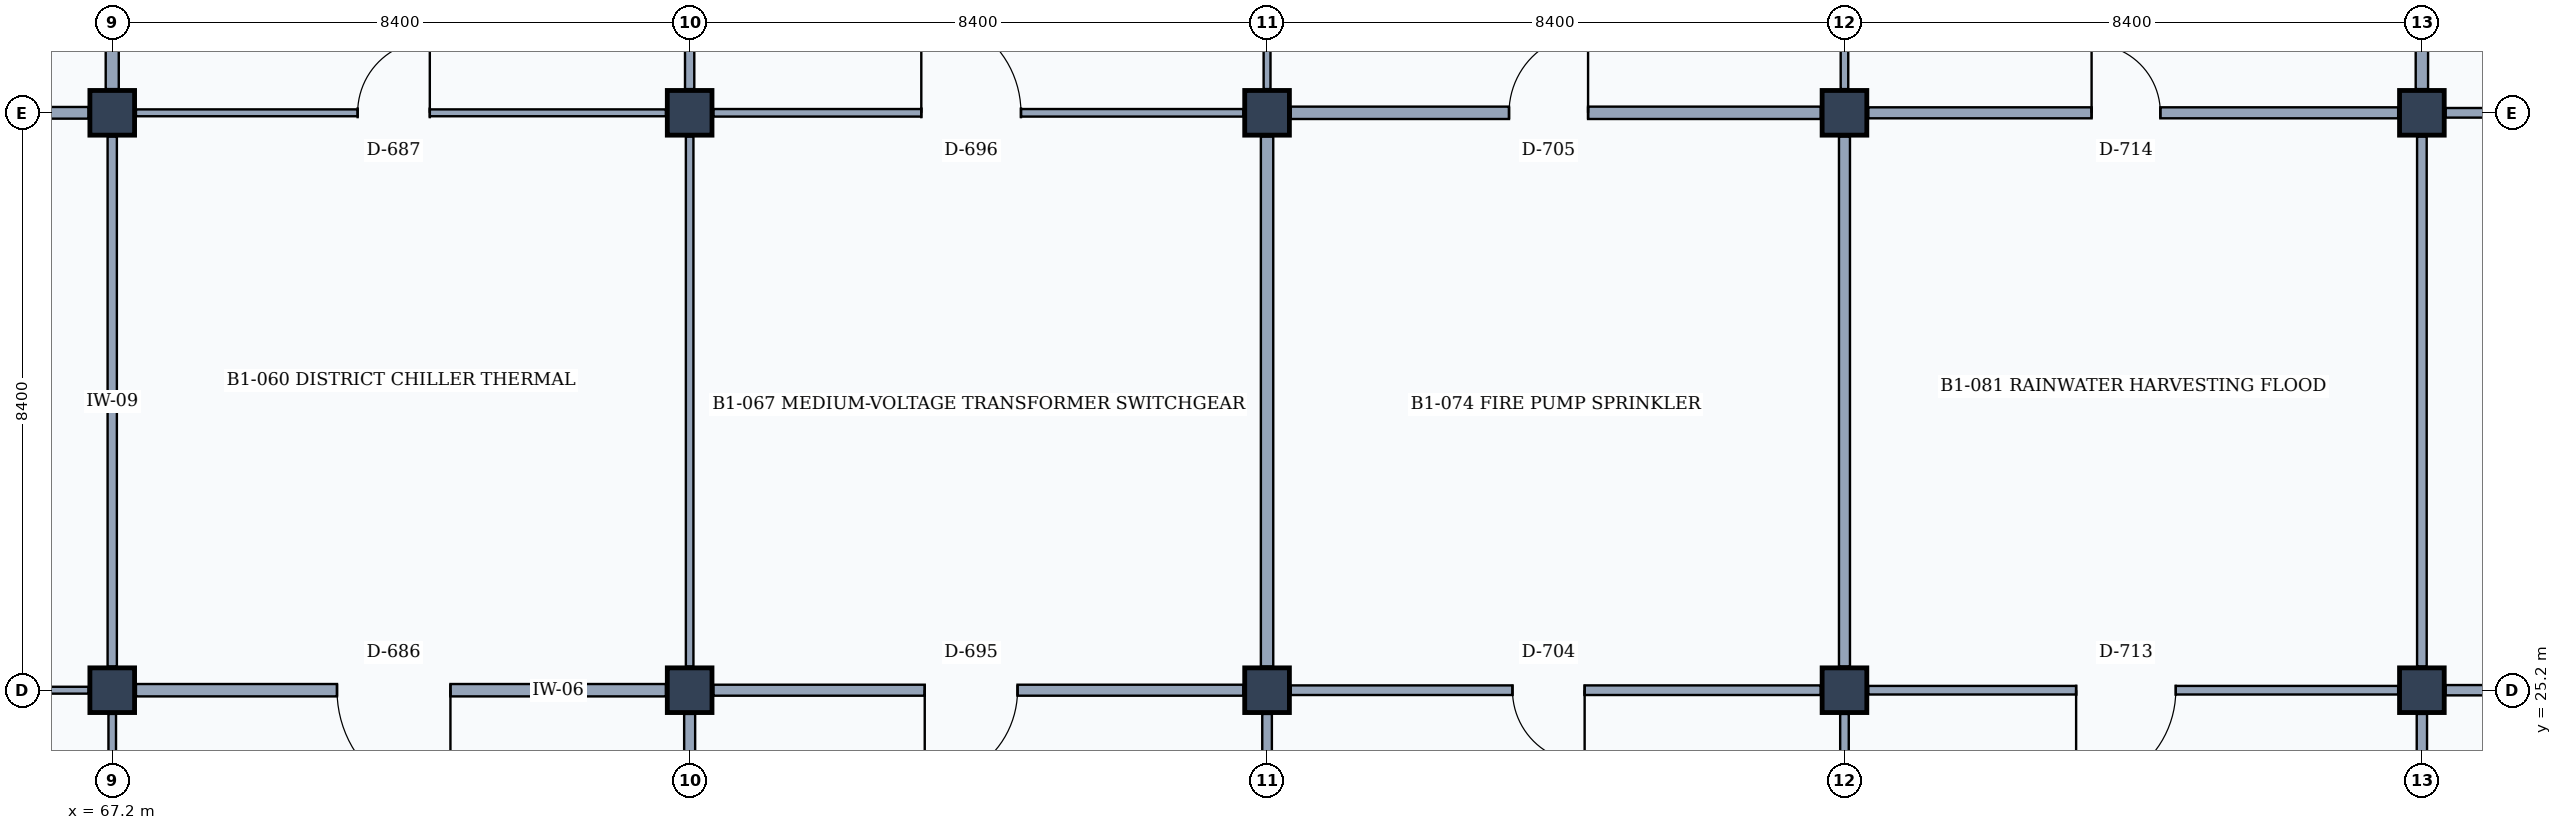
"""IFC4 building model, lengths in metres.
Left out: names, types, materials, properties, quantities, classifications, styles, units other than length and angle.
Written with IfcOpenShell. Run it as: python <this file> out.ifc"""

import sys

from ifc_helpers import new_model, si_unit, direction, frame, frame_2d, origin, origin_2d, place, context, subcontext, project, spatial, rectangle, extrude, element, fill, save


model = new_model("IFC4")
c1 = context("Model", 3, precision=1e-05, world=origin(), true_north=direction((0.0, 1.0)))
c2 = subcontext(c1, "Body", "Model", "MODEL_VIEW")
j1 = project(units=[si_unit("LENGTHUNIT", "METRE"), si_unit("PLANEANGLEUNIT", "RADIAN")], contexts=[c1])
p1 = place(None, origin())
s1 = spatial("IfcSite", under=j1, at=p1, CompositionType="ELEMENT")
p2 = place(p1, origin())
s2 = spatial("IfcBuilding", under=s1, at=p2, CompositionType="ELEMENT")
p3 = place(p2, frame((0.0, 0.0, -4.2)))
s3 = spatial("IfcBuildingStorey", under=s2, at=p3, CompositionType="ELEMENT", Elevation=-4.2)
for number, where, z_axis, x_axis in (
    (1, (67.2, 25.2, 0.0), (0.0, 0.0, 1.0), (1.0, 0.0, 0.0)),
    (2, (67.2, 33.6, 0.0), (0.0, 0.0, 1.0), (1.0, 0.0, 0.0)),
    (3, (75.6, 25.2, 0.0), (0.0, 0.0, 1.0), (1.0, 0.0, 0.0)),
    (4, (75.6, 33.6, 0.0), (0.0, 0.0, 1.0), (1.0, 0.0, 0.0)),
    (5, (84.0, 25.2, 0.0), (0.0, 0.0, 1.0), (1.0, 0.0, 0.0)),
    (6, (84.0, 33.6, 0.0), (0.0, 0.0, 1.0), (1.0, 0.0, 0.0)),
    (7, (92.4, 25.2, 0.0), (0.0, 0.0, 1.0), (1.0, 0.0, 0.0)),
    (8, (92.4, 33.6, 0.0), (0.0, 0.0, 1.0), (1.0, 0.0, 0.0)),
    (9, (100.8, 25.2, 0.0), (0.0, 0.0, 1.0), (1.0, 0.0, 0.0)),
    (10, (100.8, 33.6, 0.0), (0.0, 0.0, 1.0), (1.0, 0.0, 0.0)),
):
    element("IfcColumn", number, at=place(p3, frame(where, z_axis=z_axis, x_axis=x_axis)), inside=s3, PredefinedType="COLUMN", context=c2, shape_type="SweptSolid", body=[
        extrude(rectangle(XDim=0.65, YDim=0.65, at=origin_2d()), origin(), (0.0, 0.0, 1.0), 4.2),
    ])
p4 = place(p3, frame((67.2, 17.095, 0.0), z_axis=(0.0, 0.0, 1.0), x_axis=(0.0, 1.0, 0.0)))
e11 = element("IfcWall", 11, at=p4, inside=s3, PredefinedType="PARTITIONING", context=c2, shape_type="SweptSolid", body=[
    extrude(rectangle(XDim=7.76, YDim=0.11, at=frame_2d((3.88, 0.0))), origin(), (0.0, 0.0, 1.0), 3.25),
])
p5 = place(p3, frame((59.145, 25.2, 0.0), z_axis=(0.0, 0.0, 1.0), x_axis=(1.0, 0.0, 0.0)))
e12 = element("IfcWall", 12, at=p5, inside=s3, PredefinedType="MOVABLE", context=c2, shape_type="SweptSolid", body=[
    extrude(rectangle(XDim=7.71, YDim=0.1, at=frame_2d((3.855, 0.0))), origin(), (0.0, 0.0, 1.0), 2.95),
])
p6 = place(p5, frame((3.125, 0.0, 0.0)))
e13 = element("IfcOpeningElement", 13, at=p6, cuts=e12, PredefinedType="OPENING", context=c2, shape_type="SweptSolid", body=[
    extrude(rectangle(XDim=1.25, YDim=2.3, at=frame_2d((0.625, 1.15))), frame((0.0, 0.06, 0.0), z_axis=(0.0, -1.0, 0.0), x_axis=(1.0, 0.0, 0.0)), (0.0, 0.0, 1.0), 0.12),
])
p7 = place(p3, frame((67.2, 25.545, 0.0), z_axis=(0.0, 0.0, 1.0), x_axis=(0.0, 1.0, 0.0)))
e14 = element("IfcWall", 14, at=p7, inside=s3, PredefinedType="PARTITIONING", context=c2, shape_type="SweptSolid", body=[
    extrude(rectangle(XDim=7.71, YDim=0.135, at=frame_2d((3.855, 0.0))), origin(), (0.0, 0.0, 1.0), 3.25),
])
p8 = place(p3, frame((59.145, 33.6, 0.0), z_axis=(0.0, 0.0, 1.0), x_axis=(1.0, 0.0, 0.0)))
e15 = element("IfcWall", 15, at=p8, inside=s3, PredefinedType="PARTITIONING", context=c2, shape_type="SweptSolid", body=[
    extrude(rectangle(XDim=7.71, YDim=0.17, at=frame_2d((3.855, 0.0))), origin(), (0.0, 0.0, 1.0), 2.95),
])
p9 = place(p8, frame((3.075, 0.0, 0.0)))
e16 = element("IfcOpeningElement", 16, at=p9, cuts=e15, PredefinedType="OPENING", context=c2, shape_type="SweptSolid", body=[
    extrude(rectangle(XDim=1.35, YDim=2.25, at=frame_2d((0.675, 1.125))), frame((0.0, 0.095, 0.0), z_axis=(0.0, -1.0, 0.0), x_axis=(1.0, 0.0, 0.0)), (0.0, 0.0, 1.0), 0.19),
])
p10 = place(p3, frame((67.2, 33.945, 0.0), z_axis=(0.0, 0.0, 1.0), x_axis=(0.0, 1.0, 0.0)))
e17 = element("IfcWall", 17, at=p10, inside=s3, PredefinedType="PARTITIONING", context=c2, shape_type="SweptSolid", body=[
    extrude(rectangle(XDim=7.71, YDim=0.19, at=frame_2d((3.855, 0.0))), origin(), (0.0, 0.0, 1.0), 3.25),
])
p11 = place(p3, frame((75.6, 17.095, 0.0), z_axis=(0.0, 0.0, 1.0), x_axis=(0.0, 1.0, 0.0)))
e18 = element("IfcWall", 18, at=p11, inside=s3, PredefinedType="PARTITIONING", context=c2, shape_type="SweptSolid", body=[
    extrude(rectangle(XDim=7.76, YDim=0.16, at=frame_2d((3.88, 0.0))), origin(), (0.0, 0.0, 1.0), 3.25),
])
p12 = place(p3, frame((67.545, 25.2, 0.0), z_axis=(0.0, 0.0, 1.0), x_axis=(1.0, 0.0, 0.0)))
e19 = element("IfcWall", 19, at=p12, inside=s3, PredefinedType="PARTITIONING", context=c2, shape_type="SweptSolid", body=[
    extrude(rectangle(XDim=7.71, YDim=0.18, at=frame_2d((3.855, 0.0))), origin(), (0.0, 0.0, 1.0), 2.95),
])
p13 = place(p12, frame((2.925, 0.0, 0.0)))
e20 = element("IfcOpeningElement", 20, at=p13, cuts=e19, PredefinedType="OPENING", context=c2, shape_type="SweptSolid", body=[
    extrude(rectangle(XDim=1.65, YDim=2.25, at=frame_2d((0.825, 1.125))), frame((0.0, 0.1, 0.0), z_axis=(0.0, -1.0, 0.0), x_axis=(1.0, 0.0, 0.0)), (0.0, 0.0, 1.0), 0.2),
])
p14 = place(p3, frame((75.6, 25.545, 0.0), z_axis=(0.0, 0.0, 1.0), x_axis=(0.0, 1.0, 0.0)))
e21 = element("IfcWall", 21, at=p14, inside=s3, PredefinedType="PARTITIONING", context=c2, shape_type="SweptSolid", body=[
    extrude(rectangle(XDim=7.71, YDim=0.11, at=frame_2d((3.855, 0.0))), origin(), (0.0, 0.0, 1.0), 3.25),
])
p15 = place(p3, frame((67.545, 33.6, 0.0), z_axis=(0.0, 0.0, 1.0), x_axis=(1.0, 0.0, 0.0)))
e22 = element("IfcWall", 22, at=p15, inside=s3, PredefinedType="MOVABLE", context=c2, shape_type="SweptSolid", body=[
    extrude(rectangle(XDim=7.71, YDim=0.1, at=frame_2d((3.855, 0.0))), origin(), (0.0, 0.0, 1.0), 2.95),
])
p16 = place(p15, frame((3.225, 0.0, 0.0)))
e23 = element("IfcOpeningElement", 23, at=p16, cuts=e22, PredefinedType="OPENING", context=c2, shape_type="SweptSolid", body=[
    extrude(rectangle(XDim=1.05, YDim=2.2, at=frame_2d((0.525, 1.1))), frame((0.0, 0.06, 0.0), z_axis=(0.0, -1.0, 0.0), x_axis=(1.0, 0.0, 0.0)), (0.0, 0.0, 1.0), 0.12),
])
p17 = place(p3, frame((75.6, 33.945, 0.0), z_axis=(0.0, 0.0, 1.0), x_axis=(0.0, 1.0, 0.0)))
e24 = element("IfcWall", 24, at=p17, inside=s3, PredefinedType="PARTITIONING", context=c2, shape_type="SweptSolid", body=[
    extrude(rectangle(XDim=7.71, YDim=0.135, at=frame_2d((3.855, 0.0))), origin(), (0.0, 0.0, 1.0), 3.25),
])
p18 = place(p3, frame((84.0, 17.095, 0.0), z_axis=(0.0, 0.0, 1.0), x_axis=(0.0, 1.0, 0.0)))
e25 = element("IfcWall", 25, at=p18, inside=s3, PredefinedType="PARTITIONING", context=c2, shape_type="SweptSolid", body=[
    extrude(rectangle(XDim=7.76, YDim=0.14, at=frame_2d((3.88, 0.0))), origin(), (0.0, 0.0, 1.0), 3.25),
])
p19 = place(p3, frame((75.945, 25.2, 0.0), z_axis=(0.0, 0.0, 1.0), x_axis=(1.0, 0.0, 0.0)))
e26 = element("IfcWall", 26, at=p19, inside=s3, PredefinedType="PARTITIONING", context=c2, shape_type="SweptSolid", body=[
    extrude(rectangle(XDim=7.71, YDim=0.16, at=frame_2d((3.855, 0.0))), origin(), (0.0, 0.0, 1.0), 2.95),
])
p20 = place(p19, frame((3.075, 0.0, 0.0)))
e27 = element("IfcOpeningElement", 27, at=p20, cuts=e26, PredefinedType="OPENING", context=c2, shape_type="SweptSolid", body=[
    extrude(rectangle(XDim=1.35, YDim=2.25, at=frame_2d((0.675, 1.125))), frame((0.0, 0.09, 0.0), z_axis=(0.0, -1.0, 0.0), x_axis=(1.0, 0.0, 0.0)), (0.0, 0.0, 1.0), 0.18),
])
p21 = place(p3, frame((84.0, 25.545, 0.0), z_axis=(0.0, 0.0, 1.0), x_axis=(0.0, 1.0, 0.0)))
e28 = element("IfcWall", 28, at=p21, inside=s3, PredefinedType="PARTITIONING", context=c2, shape_type="SweptSolid", body=[
    extrude(rectangle(XDim=7.71, YDim=0.18, at=frame_2d((3.855, 0.0))), origin(), (0.0, 0.0, 1.0), 3.25),
])
p22 = place(p3, frame((75.945, 33.6, 0.0), z_axis=(0.0, 0.0, 1.0), x_axis=(1.0, 0.0, 0.0)))
e29 = element("IfcWall", 29, at=p22, inside=s3, PredefinedType="PARTITIONING", context=c2, shape_type="SweptSolid", body=[
    extrude(rectangle(XDim=7.71, YDim=0.11, at=frame_2d((3.855, 0.0))), origin(), (0.0, 0.0, 1.0), 2.95),
])
p23 = place(p22, frame((3.025, 0.0, 0.0)))
e30 = element("IfcOpeningElement", 30, at=p23, cuts=e29, PredefinedType="OPENING", context=c2, shape_type="SweptSolid", body=[
    extrude(rectangle(XDim=1.45, YDim=2.35, at=frame_2d((0.725, 1.175))), frame((0.0, 0.065, 0.0), z_axis=(0.0, -1.0, 0.0), x_axis=(1.0, 0.0, 0.0)), (0.0, 0.0, 1.0), 0.13),
])
p24 = place(p3, frame((84.0, 33.945, 0.0), z_axis=(0.0, 0.0, 1.0), x_axis=(0.0, 1.0, 0.0)))
e31 = element("IfcWall", 31, at=p24, inside=s3, PredefinedType="MOVABLE", context=c2, shape_type="SweptSolid", body=[
    extrude(rectangle(XDim=7.71, YDim=0.1, at=frame_2d((3.855, 0.0))), origin(), (0.0, 0.0, 1.0), 3.25),
])
p25 = place(p3, frame((92.4, 17.095, 0.0), z_axis=(0.0, 0.0, 1.0), x_axis=(0.0, 1.0, 0.0)))
e32 = element("IfcWall", 32, at=p25, inside=s3, PredefinedType="PARTITIONING", context=c2, shape_type="SweptSolid", body=[
    extrude(rectangle(XDim=7.76, YDim=0.125, at=frame_2d((3.88, 0.0))), origin(), (0.0, 0.0, 1.0), 3.25),
])
p26 = place(p3, frame((84.345, 25.2, 0.0), z_axis=(0.0, 0.0, 1.0), x_axis=(1.0, 0.0, 0.0)))
e33 = element("IfcWall", 33, at=p26, inside=s3, PredefinedType="PARTITIONING", context=c2, shape_type="SweptSolid", body=[
    extrude(rectangle(XDim=7.71, YDim=0.14, at=frame_2d((3.855, 0.0))), origin(), (0.0, 0.0, 1.0), 2.95),
])
p27 = place(p26, frame((3.225, 0.0, 0.0)))
e34 = element("IfcOpeningElement", 34, at=p27, cuts=e33, PredefinedType="OPENING", context=c2, shape_type="SweptSolid", body=[
    extrude(rectangle(XDim=1.05, YDim=2.2, at=frame_2d((0.525, 1.1))), frame((0.0, 0.08, 0.0), z_axis=(0.0, -1.0, 0.0), x_axis=(1.0, 0.0, 0.0)), (0.0, 0.0, 1.0), 0.16),
])
p28 = place(p3, frame((92.4, 25.545, 0.0), z_axis=(0.0, 0.0, 1.0), x_axis=(0.0, 1.0, 0.0)))
e35 = element("IfcWall", 35, at=p28, inside=s3, PredefinedType="PARTITIONING", context=c2, shape_type="SweptSolid", body=[
    extrude(rectangle(XDim=7.71, YDim=0.16, at=frame_2d((3.855, 0.0))), origin(), (0.0, 0.0, 1.0), 3.25),
])
p29 = place(p3, frame((84.345, 33.6, 0.0), z_axis=(0.0, 0.0, 1.0), x_axis=(1.0, 0.0, 0.0)))
e36 = element("IfcWall", 36, at=p29, inside=s3, PredefinedType="PARTITIONING", context=c2, shape_type="SweptSolid", body=[
    extrude(rectangle(XDim=7.71, YDim=0.18, at=frame_2d((3.855, 0.0))), origin(), (0.0, 0.0, 1.0), 2.95),
])
p30 = place(p29, frame((3.175, 0.0, 0.0)))
e37 = element("IfcOpeningElement", 37, at=p30, cuts=e36, PredefinedType="OPENING", context=c2, shape_type="SweptSolid", body=[
    extrude(rectangle(XDim=1.15, YDim=2.25, at=frame_2d((0.575, 1.125))), frame((0.0, 0.1, 0.0), z_axis=(0.0, -1.0, 0.0), x_axis=(1.0, 0.0, 0.0)), (0.0, 0.0, 1.0), 0.2),
])
p31 = place(p3, frame((92.4, 33.945, 0.0), z_axis=(0.0, 0.0, 1.0), x_axis=(0.0, 1.0, 0.0)))
e38 = element("IfcWall", 38, at=p31, inside=s3, PredefinedType="PARTITIONING", context=c2, shape_type="SweptSolid", body=[
    extrude(rectangle(XDim=7.71, YDim=0.11, at=frame_2d((3.855, 0.0))), origin(), (0.0, 0.0, 1.0), 3.25),
])
p32 = place(p3, frame((100.8, 17.095, 0.0), z_axis=(0.0, 0.0, 1.0), x_axis=(0.0, 1.0, 0.0)))
e39 = element("IfcWall", 39, at=p32, inside=s3, PredefinedType="PARTITIONING", context=c2, shape_type="SweptSolid", body=[
    extrude(rectangle(XDim=7.76, YDim=0.15, at=frame_2d((3.88, 0.0))), origin(), (0.0, 0.0, 1.0), 3.25),
])
p33 = place(p3, frame((92.745, 25.2, 0.0), z_axis=(0.0, 0.0, 1.0), x_axis=(1.0, 0.0, 0.0)))
e40 = element("IfcWall", 40, at=p33, inside=s3, PredefinedType="PARTITIONING", context=c2, shape_type="SweptSolid", body=[
    extrude(rectangle(XDim=7.71, YDim=0.125, at=frame_2d((3.855, 0.0))), origin(), (0.0, 0.0, 1.0), 2.95),
])
p34 = place(p33, frame((3.025, 0.0, 0.0)))
e41 = element("IfcOpeningElement", 41, at=p34, cuts=e40, PredefinedType="OPENING", context=c2, shape_type="SweptSolid", body=[
    extrude(rectangle(XDim=1.45, YDim=2.35, at=frame_2d((0.725, 1.175))), frame((0.0, 0.073, 0.0), z_axis=(0.0, -1.0, 0.0), x_axis=(1.0, 0.0, 0.0)), (0.0, 0.0, 1.0), 0.145),
])
p35 = place(p3, frame((100.8, 25.545, 0.0), z_axis=(0.0, 0.0, 1.0), x_axis=(0.0, 1.0, 0.0)))
e42 = element("IfcWall", 42, at=p35, inside=s3, PredefinedType="PARTITIONING", context=c2, shape_type="SweptSolid", body=[
    extrude(rectangle(XDim=7.71, YDim=0.14, at=frame_2d((3.855, 0.0))), origin(), (0.0, 0.0, 1.0), 3.25),
])
p36 = place(p3, frame((92.745, 33.6, 0.0), z_axis=(0.0, 0.0, 1.0), x_axis=(1.0, 0.0, 0.0)))
e43 = element("IfcWall", 43, at=p36, inside=s3, PredefinedType="PARTITIONING", context=c2, shape_type="SweptSolid", body=[
    extrude(rectangle(XDim=7.71, YDim=0.16, at=frame_2d((3.855, 0.0))), origin(), (0.0, 0.0, 1.0), 2.95),
])
p37 = place(p36, frame((3.25, 0.0, 0.0)))
e44 = element("IfcOpeningElement", 44, at=p37, cuts=e43, PredefinedType="OPENING", context=c2, shape_type="SweptSolid", body=[
    extrude(rectangle(XDim=1.0, YDim=2.15, at=frame_2d((0.5, 1.075))), frame((0.0, 0.09, 0.0), z_axis=(0.0, -1.0, 0.0), x_axis=(1.0, 0.0, 0.0)), (0.0, 0.0, 1.0), 0.18),
])
p38 = place(p3, frame((100.8, 33.945, 0.0), z_axis=(0.0, 0.0, 1.0), x_axis=(0.0, 1.0, 0.0)))
e45 = element("IfcWall", 45, at=p38, inside=s3, PredefinedType="PARTITIONING", context=c2, shape_type="SweptSolid", body=[
    extrude(rectangle(XDim=7.71, YDim=0.18, at=frame_2d((3.855, 0.0))), origin(), (0.0, 0.0, 1.0), 3.25),
])
p39 = place(p3, frame((101.145, 25.2, 0.0), z_axis=(0.0, 0.0, 1.0), x_axis=(1.0, 0.0, 0.0)))
e46 = element("IfcWall", 46, at=p39, inside=s3, PredefinedType="PARTITIONING", context=c2, shape_type="SweptSolid", body=[
    extrude(rectangle(XDim=7.71, YDim=0.15, at=frame_2d((3.855, 0.0))), origin(), (0.0, 0.0, 1.0), 2.95),
])
p40 = place(p39, frame((3.175, 0.0, 0.0)))
e47 = element("IfcOpeningElement", 47, at=p40, cuts=e46, PredefinedType="OPENING", context=c2, shape_type="SweptSolid", body=[
    extrude(rectangle(XDim=1.15, YDim=2.25, at=frame_2d((0.575, 1.125))), frame((0.0, 0.085, 0.0), z_axis=(0.0, -1.0, 0.0), x_axis=(1.0, 0.0, 0.0)), (0.0, 0.0, 1.0), 0.17),
])
p41 = place(p3, frame((101.145, 33.6, 0.0), z_axis=(0.0, 0.0, 1.0), x_axis=(1.0, 0.0, 0.0)))
e48 = element("IfcWall", 48, at=p41, inside=s3, PredefinedType="PARTITIONING", context=c2, shape_type="SweptSolid", body=[
    extrude(rectangle(XDim=7.71, YDim=0.14, at=frame_2d((3.855, 0.0))), origin(), (0.0, 0.0, 1.0), 2.95),
])
p42 = place(p41, frame((3.1, 0.0, 0.0)))
e49 = element("IfcOpeningElement", 49, at=p42, cuts=e48, PredefinedType="OPENING", context=c2, shape_type="SweptSolid", body=[
    extrude(rectangle(XDim=1.3, YDim=2.2, at=frame_2d((0.65, 1.1))), frame((0.0, 0.08, 0.0), z_axis=(0.0, -1.0, 0.0), x_axis=(1.0, 0.0, 0.0)), (0.0, 0.0, 1.0), 0.16),
])
p43 = place(p13, frame((1.65, 0.0, 0.0), z_axis=(0.0, 0.0, 1.0), x_axis=(-1.0, 0.0, 0.0)))
e50 = element("IfcDoor", 50, at=p43, inside=s3, OperationType="SINGLE_SWING_LEFT", PredefinedType="DOOR", context=c2, shape_type="SweptSolid", body=[
    extrude(rectangle(XDim=1.65, YDim=2.25, at=frame_2d((0.825, 1.125))), frame((0.0, 0.025, 0.0), z_axis=(0.0, -1.0, 0.0), x_axis=(1.0, 0.0, 0.0)), (0.0, 0.0, 1.0), 0.05),
])
fill(e20, e50)
p44 = place(p16, origin())
e51 = element("IfcDoor", 51, at=p44, inside=s3, OperationType="SINGLE_SWING_RIGHT", PredefinedType="DOOR", context=c2, shape_type="SweptSolid", body=[
    extrude(rectangle(XDim=1.05, YDim=2.2, at=frame_2d((0.525, 1.1))), frame((0.0, 0.025, 0.0), z_axis=(0.0, -1.0, 0.0), x_axis=(1.0, 0.0, 0.0)), (0.0, 0.0, 1.0), 0.05),
])
fill(e23, e51)
p45 = place(p20, frame((1.35, 0.0, 0.0), z_axis=(0.0, 0.0, 1.0), x_axis=(-1.0, 0.0, 0.0)))
e52 = element("IfcDoor", 52, at=p45, inside=s3, OperationType="SINGLE_SWING_RIGHT", PredefinedType="DOOR", context=c2, shape_type="SweptSolid", body=[
    extrude(rectangle(XDim=1.35, YDim=2.25, at=frame_2d((0.675, 1.125))), frame((0.0, 0.025, 0.0), z_axis=(0.0, -1.0, 0.0), x_axis=(1.0, 0.0, 0.0)), (0.0, 0.0, 1.0), 0.05),
])
fill(e27, e52)
p46 = place(p23, origin())
e53 = element("IfcDoor", 53, at=p46, inside=s3, OperationType="SINGLE_SWING_LEFT", PredefinedType="DOOR", context=c2, shape_type="SweptSolid", body=[
    extrude(rectangle(XDim=1.45, YDim=2.35, at=frame_2d((0.725, 1.175))), frame((0.0, 0.025, 0.0), z_axis=(0.0, -1.0, 0.0), x_axis=(1.0, 0.0, 0.0)), (0.0, 0.0, 1.0), 0.05),
])
fill(e30, e53)
p47 = place(p27, frame((1.05, 0.0, 0.0), z_axis=(0.0, 0.0, 1.0), x_axis=(-1.0, 0.0, 0.0)))
e54 = element("IfcDoor", 54, at=p47, inside=s3, OperationType="SINGLE_SWING_LEFT", PredefinedType="DOOR", context=c2, shape_type="SweptSolid", body=[
    extrude(rectangle(XDim=1.05, YDim=2.2, at=frame_2d((0.525, 1.1))), frame((0.0, 0.025, 0.0), z_axis=(0.0, -1.0, 0.0), x_axis=(1.0, 0.0, 0.0)), (0.0, 0.0, 1.0), 0.05),
])
fill(e34, e54)
p48 = place(p30, origin())
e55 = element("IfcDoor", 55, at=p48, inside=s3, OperationType="SINGLE_SWING_RIGHT", PredefinedType="DOOR", context=c2, shape_type="SweptSolid", body=[
    extrude(rectangle(XDim=1.15, YDim=2.25, at=frame_2d((0.575, 1.125))), frame((0.0, 0.025, 0.0), z_axis=(0.0, -1.0, 0.0), x_axis=(1.0, 0.0, 0.0)), (0.0, 0.0, 1.0), 0.05),
])
fill(e37, e55)
p49 = place(p34, frame((1.45, 0.0, 0.0), z_axis=(0.0, 0.0, 1.0), x_axis=(-1.0, 0.0, 0.0)))
e56 = element("IfcDoor", 56, at=p49, inside=s3, OperationType="SINGLE_SWING_RIGHT", PredefinedType="DOOR", context=c2, shape_type="SweptSolid", body=[
    extrude(rectangle(XDim=1.45, YDim=2.35, at=frame_2d((0.725, 1.175))), frame((0.0, 0.025, 0.0), z_axis=(0.0, -1.0, 0.0), x_axis=(1.0, 0.0, 0.0)), (0.0, 0.0, 1.0), 0.05),
])
fill(e41, e56)
p50 = place(p37, origin())
e57 = element("IfcDoor", 57, at=p50, inside=s3, OperationType="SINGLE_SWING_LEFT", PredefinedType="DOOR", context=c2, shape_type="SweptSolid", body=[
    extrude(rectangle(XDim=1.0, YDim=2.15, at=frame_2d((0.5, 1.075))), frame((0.0, 0.025, 0.0), z_axis=(0.0, -1.0, 0.0), x_axis=(1.0, 0.0, 0.0)), (0.0, 0.0, 1.0), 0.05),
])
fill(e44, e57)
save(model, sys.argv[1])
